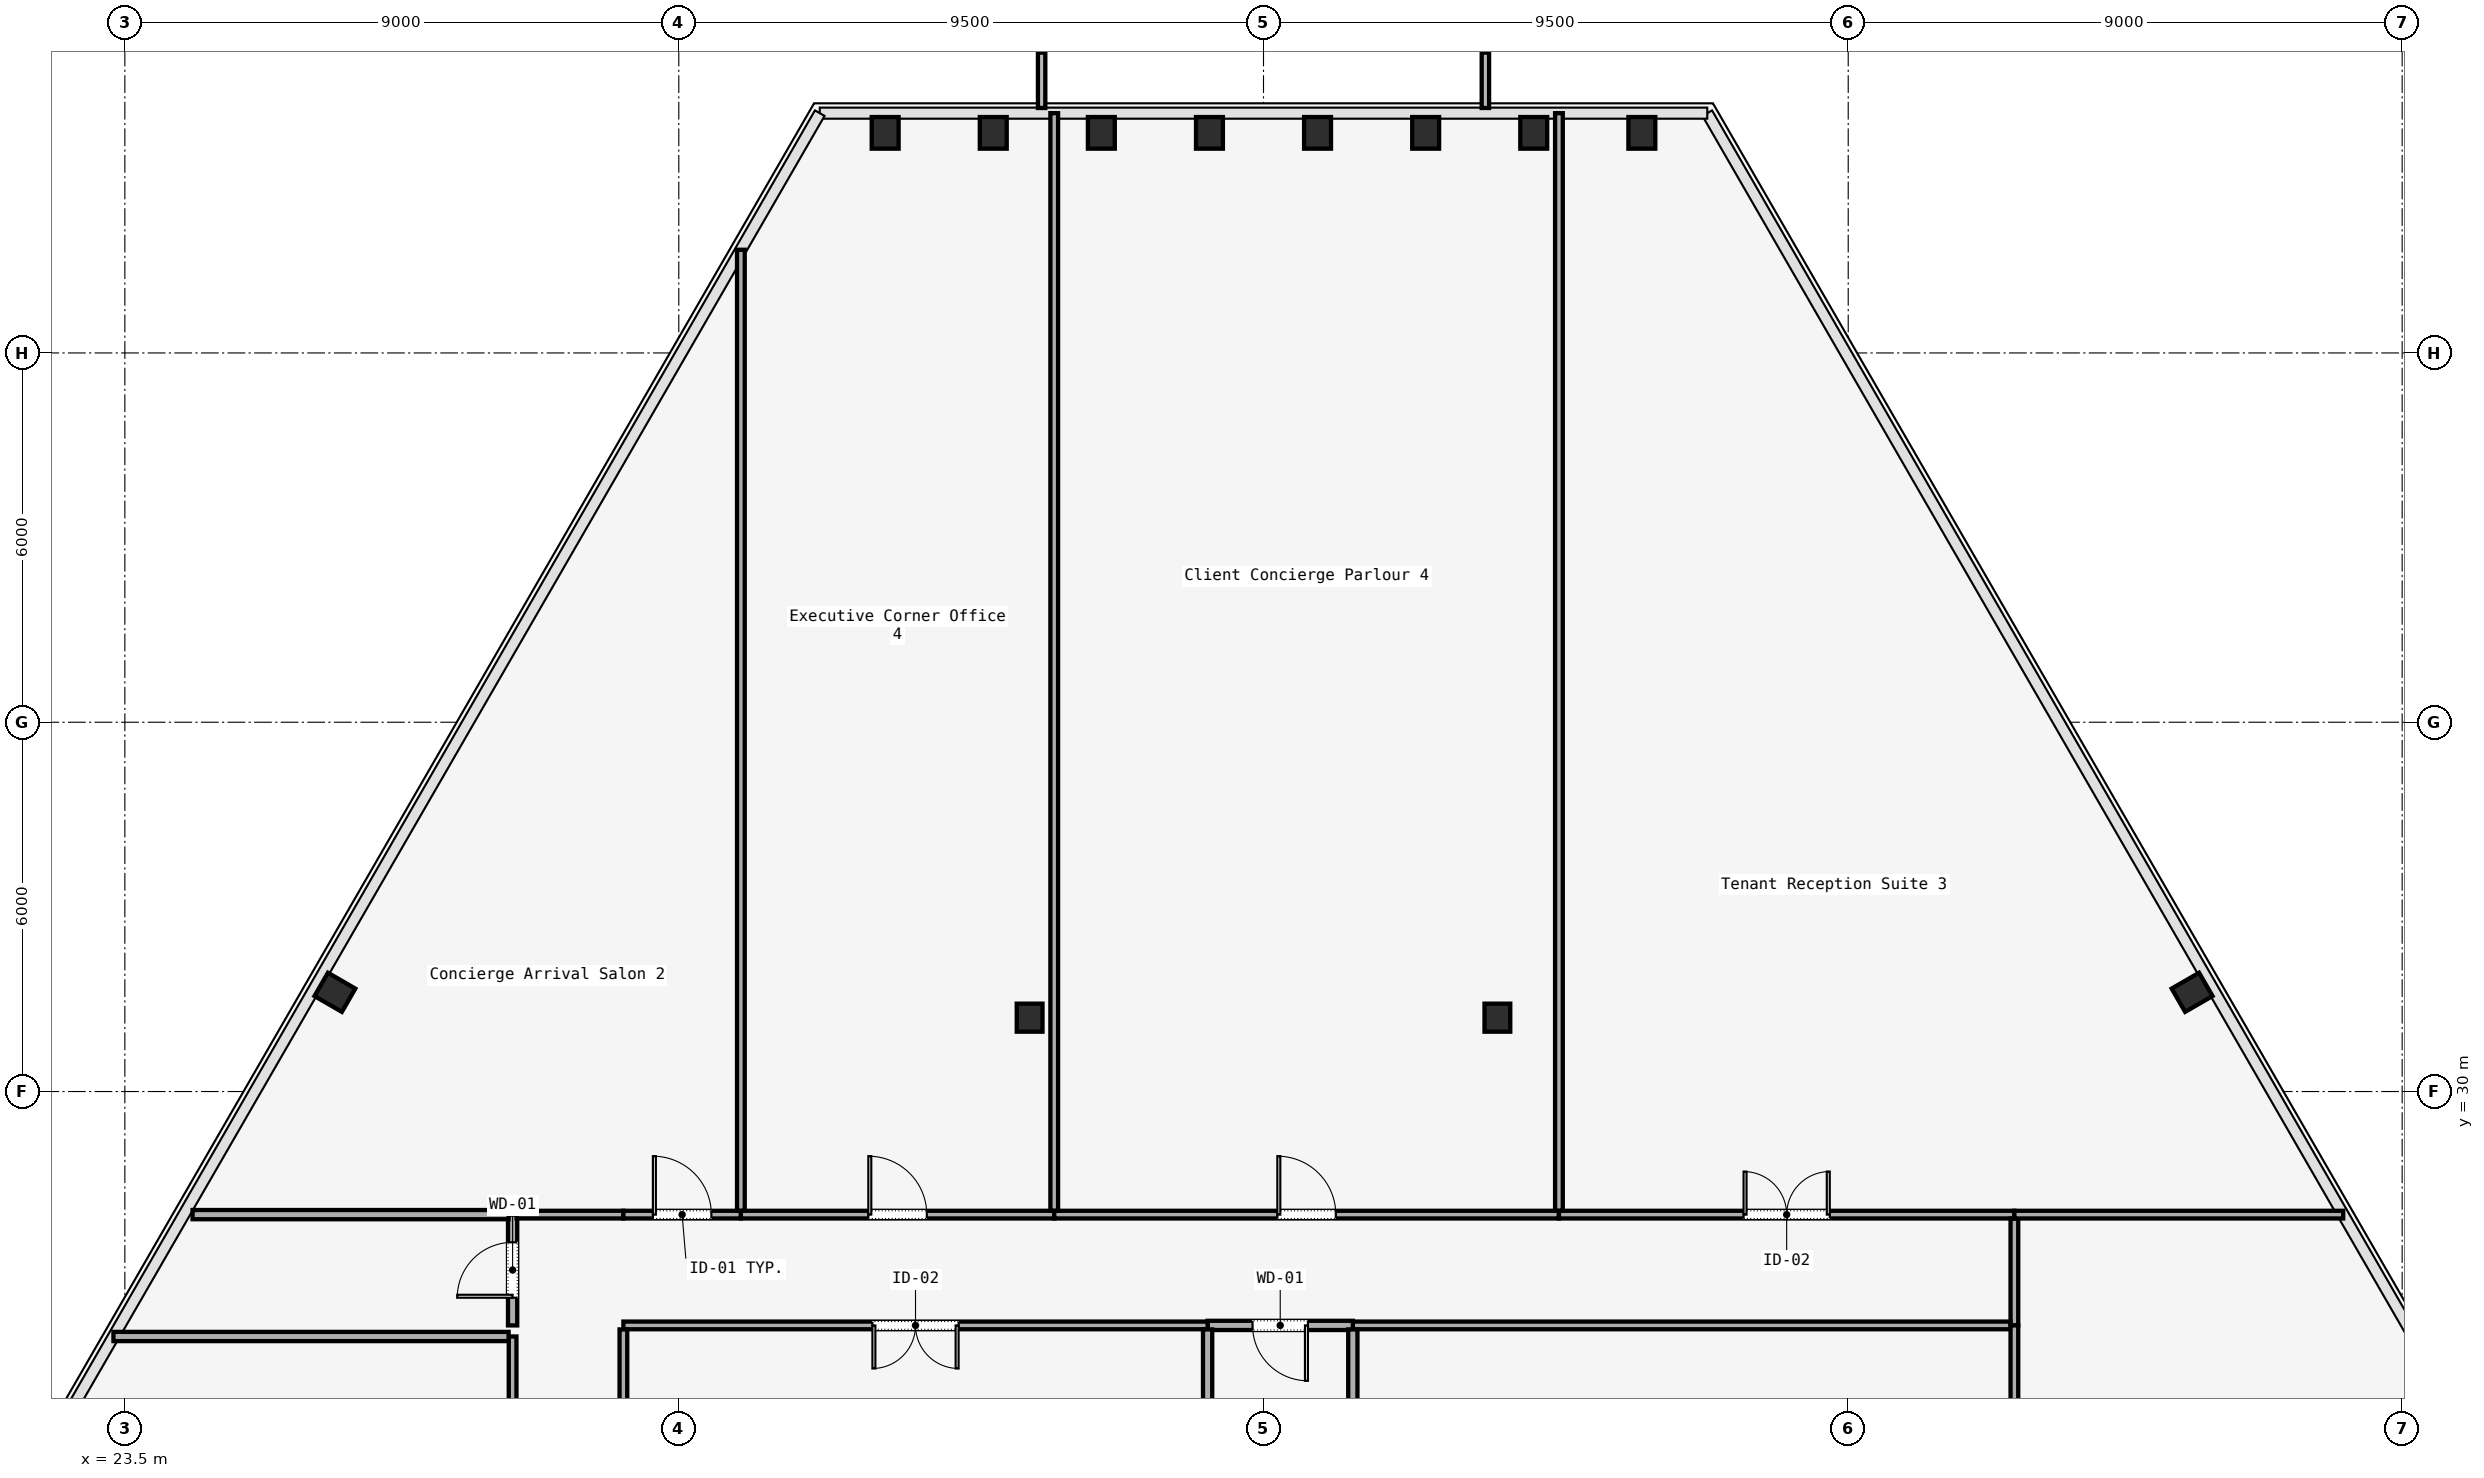
"""IFC4 building model, lengths in metres.
Left out: names, types, materials, properties, quantities, classifications, styles, units other than length and angle.
Written with IfcOpenShell. Run it as: python <this file> out.ifc"""

import sys

from ifc_helpers import new_model, si_unit, direction, frame, frame_2d, origin, origin_2d, place, context, subcontext, project, spatial, rectangle, i_section, extrude, element, fill, save


model = new_model("IFC4")
c1 = context("Model", 3, precision=1e-05, world=origin(), true_north=direction((0.0, 1.0)))
c2 = subcontext(c1, "Body", "Model", "MODEL_VIEW")
j1 = project(units=[si_unit("LENGTHUNIT", "METRE"), si_unit("PLANEANGLEUNIT", "RADIAN")], contexts=[c1])
p1 = place(None, origin())
s1 = spatial("IfcSite", under=j1, at=p1, CompositionType="ELEMENT")
p2 = place(p1, origin())
s2 = spatial("IfcBuilding", under=s1, at=p2, CompositionType="ELEMENT")
p3 = place(p2, frame((0.0, 0.0, 81.6)))
s3 = spatial("IfcBuildingStorey", under=s2, at=p3, CompositionType="ELEMENT", Elevation=81.6)
for number, where, z_axis, x_axis in (
    (1, (38.2, 31.2, 0.0), (0.0, 0.0, 1.0), (1.0, 0.0, 0.0)),
    (2, (45.8, 31.2, 0.0), (0.0, 0.0, 1.0), (1.0, 0.0, 0.0)),
):
    element("IfcColumn", number, at=place(p3, frame(where, z_axis=z_axis, x_axis=x_axis)), inside=s3, PredefinedType="COLUMN", context=c2, shape_type="SweptSolid", body=[
        extrude(i_section(OverallWidth=0.418, OverallDepth=0.456, WebThickness=0.042, FlangeThickness=0.067, FilletRadius=0.015, at=origin_2d()), origin(), (0.0, 0.0, 1.0), 3.58),
    ])
for number, where, z_axis, x_axis in (
    (3, (57.087, 31.612, 0.0), (0.0, 0.0, 1.0), (-0.5, 0.866, 0.0)),
    (4, (48.147, 45.576, 0.0), (0.0, 0.0, 1.0), (1.0, 0.0, 0.0)),
    (5, (46.391, 45.576, 0.0), (0.0, 0.0, 1.0), (1.0, 0.0, 0.0)),
    (6, (44.635, 45.576, 0.0), (0.0, 0.0, 1.0), (1.0, 0.0, 0.0)),
    (7, (42.878, 45.576, 0.0), (0.0, 0.0, 1.0), (1.0, 0.0, 0.0)),
    (8, (41.122, 45.576, 0.0), (0.0, 0.0, 1.0), (1.0, 0.0, 0.0)),
    (9, (39.365, 45.576, 0.0), (0.0, 0.0, 1.0), (1.0, 0.0, 0.0)),
    (10, (37.609, 45.576, 0.0), (0.0, 0.0, 1.0), (1.0, 0.0, 0.0)),
    (11, (35.853, 45.576, 0.0), (0.0, 0.0, 1.0), (1.0, 0.0, 0.0)),
    (12, (26.913, 31.612, 0.0), (0.0, 0.0, 1.0), (0.5, 0.866, 0.0)),
):
    element("IfcColumn", number, at=place(p3, frame(where, z_axis=z_axis, x_axis=x_axis)), inside=s3, PredefinedType="COLUMN", context=c2, shape_type="SweptSolid", body=[
        extrude(i_section(OverallWidth=0.437, OverallDepth=0.514, WebThickness=0.061, FlangeThickness=0.077, FilletRadius=0.015, at=origin_2d()), origin(), (0.0, 0.0, 1.0), 3.58),
    ])
p4 = place(p3, frame((29.8, 17.065, 0.0), z_axis=(0.0, 0.0, 1.0), x_axis=(0.0, 1.0, 0.0)))
e13 = element("IfcWall", 13, at=p4, inside=s3, PredefinedType="PARTITIONING", context=c2, shape_type="SweptSolid", body=[
    extrude(rectangle(XDim=8.955, YDim=0.125, at=frame_2d((4.478, 0.0))), origin(), (0.0, 0.0, 1.0), 2.95),
])
p5 = place(p4, frame((4.002, 0.0, 0.0)))
e14 = element("IfcOpeningElement", 14, at=p5, cuts=e13, PredefinedType="OPENING", context=c2, shape_type="SweptSolid", body=[
    extrude(rectangle(XDim=0.95, YDim=2.2, at=frame_2d((0.475, 1.1))), frame((0.0, 0.062, 0.0), z_axis=(0.0, -1.0, 0.0), x_axis=(1.0, 0.0, 0.0)), (0.0, 0.0, 1.0), 0.125),
])
p6 = place(p3, frame((29.8, 26.2, 0.0), z_axis=(0.0, 0.0, 1.0), x_axis=(0.0, 1.0, 0.0)))
e15 = element("IfcWall", 15, at=p6, inside=s3, PredefinedType="PARTITIONING", context=c2, shape_type="SweptSolid", body=[
    extrude(rectangle(XDim=1.8, YDim=0.15, at=frame_2d((0.9, 0.0))), origin(), (0.0, 0.0, 1.0), 2.95),
])
p7 = place(p6, frame((0.45, 0.0, 0.0)))
e16 = element("IfcOpeningElement", 16, at=p7, cuts=e15, PredefinedType="OPENING", context=c2, shape_type="SweptSolid", body=[
    extrude(rectangle(XDim=0.9, YDim=2.15, at=frame_2d((0.45, 1.075))), frame((0.0, 0.075, 0.0), z_axis=(0.0, -1.0, 0.0), x_axis=(1.0, 0.0, 0.0)), (0.0, 0.0, 1.0), 0.15),
])
p8 = place(p3, frame((29.865, 28.0, 0.0), z_axis=(0.0, 0.0, 1.0), x_axis=(1.0, 0.0, 0.0)))
e17 = element("IfcWall", 17, at=p8, inside=s3, PredefinedType="PARTITIONING", context=c2, shape_type="SweptSolid", body=[
    extrude(rectangle(XDim=1.735, YDim=0.125, at=frame_2d((0.868, 0.0))), origin(), (0.0, 0.0, 1.0), 2.95),
])
p9 = place(p3, frame((31.6, 28.0, 0.0), z_axis=(0.0, 0.0, 1.0), x_axis=(1.0, 0.0, 0.0)))
e18 = element("IfcWall", 18, at=p9, inside=s3, PredefinedType="PARTITIONING", context=c2, shape_type="SweptSolid", body=[
    extrude(rectangle(XDim=1.909, YDim=0.125, at=frame_2d((0.954, 0.0))), origin(), (0.0, 0.0, 1.0), 2.95),
])
p10 = place(p9, frame((0.479, 0.0, 0.0)))
e19 = element("IfcOpeningElement", 19, at=p10, cuts=e18, PredefinedType="OPENING", context=c2, shape_type="SweptSolid", body=[
    extrude(rectangle(XDim=0.95, YDim=2.2, at=frame_2d((0.475, 1.1))), frame((0.0, 0.062, 0.0), z_axis=(0.0, -1.0, 0.0), x_axis=(1.0, 0.0, 0.0)), (0.0, 0.0, 1.0), 0.125),
])
p11 = place(p3, frame((33.509, 28.0, 0.0), z_axis=(0.0, 0.0, 1.0), x_axis=(1.0, 0.0, 0.0)))
e20 = element("IfcWall", 20, at=p11, inside=s3, PredefinedType="PARTITIONING", context=c2, shape_type="SweptSolid", body=[
    extrude(rectangle(XDim=5.091, YDim=0.125, at=frame_2d((2.546, 0.0))), origin(), (0.0, 0.0, 1.0), 2.95),
])
p12 = place(p11, frame((2.071, 0.0, 0.0)))
e21 = element("IfcOpeningElement", 21, at=p12, cuts=e20, PredefinedType="OPENING", context=c2, shape_type="SweptSolid", body=[
    extrude(rectangle(XDim=0.95, YDim=2.2, at=frame_2d((0.475, 1.1))), frame((0.0, 0.062, 0.0), z_axis=(0.0, -1.0, 0.0), x_axis=(1.0, 0.0, 0.0)), (0.0, 0.0, 1.0), 0.125),
])
p13 = place(p3, frame((38.6, 28.0, 0.0), z_axis=(0.0, 0.0, 1.0), x_axis=(1.0, 0.0, 0.0)))
e22 = element("IfcWall", 22, at=p13, inside=s3, PredefinedType="PARTITIONING", context=c2, shape_type="SweptSolid", body=[
    extrude(rectangle(XDim=8.2, YDim=0.125, at=frame_2d((4.1, 0.0))), origin(), (0.0, 0.0, 1.0), 2.95),
])
p14 = place(p13, frame((3.625, 0.0, 0.0)))
e23 = element("IfcOpeningElement", 23, at=p14, cuts=e22, PredefinedType="OPENING", context=c2, shape_type="SweptSolid", body=[
    extrude(rectangle(XDim=0.95, YDim=2.2, at=frame_2d((0.475, 1.1))), frame((0.0, 0.062, 0.0), z_axis=(0.0, -1.0, 0.0), x_axis=(1.0, 0.0, 0.0)), (0.0, 0.0, 1.0), 0.125),
])
p15 = place(p3, frame((46.8, 28.0, 0.0), z_axis=(0.0, 0.0, 1.0), x_axis=(1.0, 0.0, 0.0)))
e24 = element("IfcWall", 24, at=p15, inside=s3, PredefinedType="PARTITIONING", context=c2, shape_type="SweptSolid", body=[
    extrude(rectangle(XDim=7.4, YDim=0.125, at=frame_2d((3.7, 0.0))), origin(), (0.0, 0.0, 1.0), 2.95),
])
p16 = place(p15, frame((3.0, 0.0, 0.0)))
e25 = element("IfcOpeningElement", 25, at=p16, cuts=e24, PredefinedType="OPENING", context=c2, shape_type="SweptSolid", body=[
    extrude(rectangle(XDim=1.4, YDim=2.2, at=frame_2d((0.7, 1.1))), frame((0.0, 0.062, 0.0), z_axis=(0.0, -1.0, 0.0), x_axis=(1.0, 0.0, 0.0)), (0.0, 0.0, 1.0), 0.125),
])
p17 = place(p3, frame((54.2, 27.935, 0.0), z_axis=(0.0, 0.0, 1.0), x_axis=(0.0, -1.0, 0.0)))
e26 = element("IfcWall", 26, at=p17, inside=s3, PredefinedType="PARTITIONING", context=c2, shape_type="SweptSolid", body=[
    extrude(rectangle(XDim=1.735, YDim=0.125, at=frame_2d((0.868, 0.0))), origin(), (0.0, 0.0, 1.0), 2.95),
])
p18 = place(p3, frame((54.135, 26.2, 0.0), z_axis=(0.0, 0.0, 1.0), x_axis=(-1.0, 0.0, 0.0)))
e27 = element("IfcWall", 27, at=p18, inside=s3, PredefinedType="PARTITIONING", context=c2, shape_type="SweptSolid", body=[
    extrude(rectangle(XDim=10.684, YDim=0.125, at=frame_2d((5.342, 0.0))), origin(), (0.0, 0.0, 1.0), 2.95),
])
p19 = place(p3, frame((43.451, 26.2, 0.0), z_axis=(0.0, 0.0, 1.0), x_axis=(-1.0, 0.0, 0.0)))
e28 = element("IfcWall", 28, at=p19, inside=s3, PredefinedType="PARTITIONING", context=c2, shape_type="SweptSolid", body=[
    extrude(rectangle(XDim=2.359, YDim=0.15, at=frame_2d((1.18, 0.0))), origin(), (0.0, 0.0, 1.0), 2.95),
])
p20 = place(p19, frame((0.73, 0.0, 0.0)))
e29 = element("IfcOpeningElement", 29, at=p20, cuts=e28, PredefinedType="OPENING", context=c2, shape_type="SweptSolid", body=[
    extrude(rectangle(XDim=0.9, YDim=2.15, at=frame_2d((0.45, 1.075))), frame((0.0, 0.075, 0.0), z_axis=(0.0, -1.0, 0.0), x_axis=(1.0, 0.0, 0.0)), (0.0, 0.0, 1.0), 0.15),
])
p21 = place(p3, frame((41.092, 26.2, 0.0), z_axis=(0.0, 0.0, 1.0), x_axis=(-1.0, 0.0, 0.0)))
e30 = element("IfcWall", 30, at=p21, inside=s3, PredefinedType="PARTITIONING", context=c2, shape_type="SweptSolid", body=[
    extrude(rectangle(XDim=9.492, YDim=0.125, at=frame_2d((4.746, 0.0))), origin(), (0.0, 0.0, 1.0), 2.95),
])
p22 = place(p21, frame((4.046, 0.0, 0.0)))
e31 = element("IfcOpeningElement", 31, at=p22, cuts=e30, PredefinedType="OPENING", context=c2, shape_type="SweptSolid", body=[
    extrude(rectangle(XDim=1.4, YDim=2.2, at=frame_2d((0.7, 1.1))), frame((0.0, 0.062, 0.0), z_axis=(0.0, -1.0, 0.0), x_axis=(1.0, 0.0, 0.0)), (0.0, 0.0, 1.0), 0.125),
])
p23 = place(p3, frame((31.6, 26.135, 0.0), z_axis=(0.0, 0.0, 1.0), x_axis=(0.0, -1.0, 0.0)))
e32 = element("IfcWall", 32, at=p23, inside=s3, PredefinedType="PARTITIONING", context=c2, shape_type="SweptSolid", body=[
    extrude(rectangle(XDim=9.135, YDim=0.125, at=frame_2d((4.567, 0.0))), origin(), (0.0, 0.0, 1.0), 2.95),
])
p24 = place(p3, frame((23.315, 26.02, 0.0), z_axis=(0.0, 0.0, 1.0), x_axis=(1.0, 0.0, 0.0)))
e33 = element("IfcWall", 33, at=p24, inside=s3, PredefinedType="PARTITIONING", context=c2, shape_type="SweptSolid", body=[
    extrude(rectangle(XDim=6.42, YDim=0.15, at=frame_2d((3.21, 0.0))), origin(), (0.0, 0.0, 1.0), 2.95),
])
for number, where, z_axis, x_axis in (
    (34, (41.092, 26.135, 0.0), (0.0, 0.0, 1.0), (0.0, -1.0, 0.0)),
    (35, (43.451, 26.135, 0.0), (0.0, 0.0, 1.0), (0.0, -1.0, 0.0)),
):
    element("IfcWall", number, at=place(p3, frame(where, z_axis=z_axis, x_axis=x_axis)), inside=s3, PredefinedType="PARTITIONING", context=c2, shape_type="SweptSolid", body=[
        extrude(rectangle(XDim=9.07, YDim=0.15, at=frame_2d((4.535, 0.0))), origin(), (0.0, 0.0, 1.0), 2.95),
    ])
p25 = place(p3, frame((54.2, 26.2, 0.0), z_axis=(0.0, 0.0, 1.0), x_axis=(0.0, -1.0, 0.0)))
e36 = element("IfcWall", 36, at=p25, inside=s3, PredefinedType="PARTITIONING", context=c2, shape_type="SweptSolid", body=[
    extrude(rectangle(XDim=9.135, YDim=0.125, at=frame_2d((4.567, 0.0))), origin(), (0.0, 0.0, 1.0), 2.95),
])
p26 = place(p3, frame((54.2, 28.0, 0.0), z_axis=(0.0, 0.0, 1.0), x_axis=(1.0, 0.0, 0.0)))
e37 = element("IfcWall", 37, at=p26, inside=s3, PredefinedType="PARTITIONING", context=c2, shape_type="SweptSolid", body=[
    extrude(rectangle(XDim=5.342, YDim=0.125, at=frame_2d((2.671, 0.0))), origin(), (0.0, 0.0, 1.0), 2.95),
])
p27 = place(p3, frame((24.6, 28.0, 0.0), z_axis=(0.0, 0.0, 1.0), x_axis=(1.0, 0.0, 0.0)))
e38 = element("IfcWall", 38, at=p27, inside=s3, PredefinedType="PARTITIONING", context=c2, shape_type="SweptSolid", body=[
    extrude(rectangle(XDim=5.135, YDim=0.15, at=frame_2d((2.567, 0.0))), origin(), (0.0, 0.0, 1.0), 2.95),
])
p28 = place(p3, frame((33.509, 43.677, 0.0), z_axis=(0.0, 0.0, 1.0), x_axis=(0.0, -1.0, 0.0)))
e39 = element("IfcWall", 39, at=p28, inside=s3, PredefinedType="PARTITIONING", context=c2, shape_type="SweptSolid", body=[
    extrude(rectangle(XDim=15.612, YDim=0.125, at=frame_2d((7.806, 0.0))), origin(), (0.0, 0.0, 1.0), 2.95),
])
for number, where, z_axis, x_axis in (
    (40, (46.8, 28.065, 0.0), (0.0, 0.0, 1.0), (0.0, 1.0, 0.0)),
    (41, (38.6, 45.896, 0.0), (0.0, 0.0, 1.0), (0.0, -1.0, 0.0)),
):
    element("IfcWall", number, at=place(p3, frame(where, z_axis=z_axis, x_axis=x_axis)), inside=s3, PredefinedType="PARTITIONING", context=c2, shape_type="SweptSolid", body=[
        extrude(rectangle(XDim=17.831, YDim=0.125, at=frame_2d((8.916, 0.0))), origin(), (0.0, 0.0, 1.0), 2.95),
    ])
p29 = place(p22, origin())
e42 = element("IfcDoor", 42, at=p29, inside=s3, OperationType="SINGLE_SWING_RIGHT", PredefinedType="DOOR", context=c2, shape_type="SweptSolid", body=[
    extrude(rectangle(XDim=1.4, YDim=2.2, at=frame_2d((0.7, 1.1))), frame((0.0, 0.025, 0.0), z_axis=(0.0, -1.0, 0.0), x_axis=(1.0, 0.0, 0.0)), (0.0, 0.0, 1.0), 0.05),
])
fill(e31, e42)
p30 = place(p20, origin())
e43 = element("IfcDoor", 43, at=p30, inside=s3, OperationType="SINGLE_SWING_LEFT", PredefinedType="DOOR", context=c2, shape_type="SweptSolid", body=[
    extrude(rectangle(XDim=0.9, YDim=2.15, at=frame_2d((0.45, 1.075))), frame((0.0, 0.025, 0.0), z_axis=(0.0, -1.0, 0.0), x_axis=(1.0, 0.0, 0.0)), (0.0, 0.0, 1.0), 0.05),
])
fill(e29, e43)
p31 = place(p7, origin())
e44 = element("IfcDoor", 44, at=p31, inside=s3, OperationType="SINGLE_SWING_RIGHT", PredefinedType="DOOR", context=c2, shape_type="SweptSolid", body=[
    extrude(rectangle(XDim=0.9, YDim=2.15, at=frame_2d((0.45, 1.075))), frame((0.0, 0.025, 0.0), z_axis=(0.0, -1.0, 0.0), x_axis=(1.0, 0.0, 0.0)), (0.0, 0.0, 1.0), 0.05),
])
fill(e16, e44)
p32 = place(p10, origin())
e45 = element("IfcDoor", 45, at=p32, inside=s3, OperationType="SINGLE_SWING_LEFT", PredefinedType="DOOR", context=c2, shape_type="SweptSolid", body=[
    extrude(rectangle(XDim=0.95, YDim=2.2, at=frame_2d((0.475, 1.1))), frame((0.0, 0.025, 0.0), z_axis=(0.0, -1.0, 0.0), x_axis=(1.0, 0.0, 0.0)), (0.0, 0.0, 1.0), 0.05),
])
fill(e19, e45)
p33 = place(p16, origin())
e46 = element("IfcDoor", 46, at=p33, inside=s3, OperationType="SINGLE_SWING_RIGHT", PredefinedType="DOOR", context=c2, shape_type="SweptSolid", body=[
    extrude(rectangle(XDim=1.4, YDim=2.2, at=frame_2d((0.7, 1.1))), frame((0.0, 0.025, 0.0), z_axis=(0.0, -1.0, 0.0), x_axis=(1.0, 0.0, 0.0)), (0.0, 0.0, 1.0), 0.05),
])
fill(e25, e46)
p34 = place(p12, origin())
e47 = element("IfcDoor", 47, at=p34, inside=s3, OperationType="SINGLE_SWING_LEFT", PredefinedType="DOOR", context=c2, shape_type="SweptSolid", body=[
    extrude(rectangle(XDim=0.95, YDim=2.2, at=frame_2d((0.475, 1.1))), frame((0.0, 0.025, 0.0), z_axis=(0.0, -1.0, 0.0), x_axis=(1.0, 0.0, 0.0)), (0.0, 0.0, 1.0), 0.05),
])
fill(e21, e47)
p35 = place(p14, origin())
e48 = element("IfcDoor", 48, at=p35, inside=s3, OperationType="SINGLE_SWING_RIGHT", PredefinedType="DOOR", context=c2, shape_type="SweptSolid", body=[
    extrude(rectangle(XDim=0.95, YDim=2.2, at=frame_2d((0.475, 1.1))), frame((0.0, 0.025, 0.0), z_axis=(0.0, -1.0, 0.0), x_axis=(1.0, 0.0, 0.0)), (0.0, 0.0, 1.0), 0.05),
])
fill(e23, e48)
save(model, sys.argv[1])
